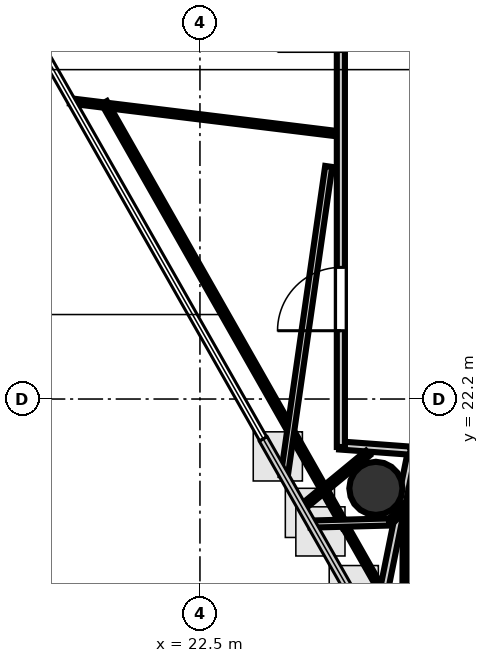
"""IFC4 building model, lengths in metres.
Left out: names, types, materials, properties, quantities, classifications, styles, units other than length and angle.
Written with IfcOpenShell. Run it as: python <this file> out.ifc"""

import sys

from ifc_helpers import new_model, si_unit, direction, frame, frame_2d, origin, origin_2d, place, context, subcontext, project, spatial, rectangle, hollow_circle, extrude, element, fill, save


model = new_model("IFC4")
c1 = context("Model", 3, precision=1e-05, world=origin(), true_north=direction((0.0, 1.0)))
c2 = subcontext(c1, "Body", "Model", "MODEL_VIEW")
j1 = project(units=[si_unit("LENGTHUNIT", "METRE"), si_unit("PLANEANGLEUNIT", "RADIAN")], contexts=[c1])
p1 = place(None, origin())
s1 = spatial("IfcSite", under=j1, at=p1, CompositionType="ELEMENT")
p2 = place(p1, origin())
s2 = spatial("IfcBuilding", under=s1, at=p2, CompositionType="ELEMENT")
p3 = place(p2, frame((0.0, 0.0, 272.3)))
s3 = spatial("IfcBuildingStorey", under=s2, at=p3, CompositionType="ELEMENT", Elevation=272.3)
p4 = place(p3, frame((25.972, 20.437, 0.0), z_axis=(0.0, 0.0, 1.0), x_axis=(1.0, 0.0, 0.0)))
e1 = element("IfcColumn", 1, at=p4, inside=s3, PredefinedType="COLUMN", context=c2, shape_type="SweptSolid", body=[
    extrude(hollow_circle(Radius=0.525, WallThickness=0.028, at=origin_2d()), origin(), (0.0, 0.0, 1.0), 3.7),
])
p5 = place(p3, frame((25.951, 17.535, 0.0), z_axis=(0.0, 0.0, 1.0), x_axis=(0.197834740862, 0.980235387704, 0.0)))
e2 = element("IfcWall", 2, at=p5, inside=s3, PredefinedType="PARTITIONING", context=c2, shape_type="SweptSolid", body=[
    extrude(rectangle(XDim=3.688, YDim=0.16, at=frame_2d((1.844, 0.0))), origin(), (0.0, 0.0, 1.0), 2.72),
])
p6 = place(p3, frame((26.652, 21.181, 0.0), z_axis=(0.0, 0.0, 1.0), x_axis=(-0.997303696291, 0.073384857861, 0.0)))
e3 = element("IfcWall", 3, at=p6, inside=s3, PredefinedType="PARTITIONING", context=c2, shape_type="SweptSolid", body=[
    extrude(rectangle(XDim=1.404, YDim=0.16, at=frame_2d((0.702, 0.0))), origin(), (0.0, 0.0, 1.0), 2.72),
])
p7 = place(p3, frame((25.281, 21.253, 0.0), z_axis=(0.0, 0.0, 1.0), x_axis=(0.0, 1.0, 0.0)))
e4 = element("IfcWall", 4, at=p7, inside=s3, PredefinedType="PARTITIONING", context=c2, shape_type="SweptSolid", body=[
    extrude(rectangle(XDim=11.297, YDim=0.16, at=frame_2d((5.648, 0.0))), origin(), (0.0, 0.0, 1.0), 2.72),
])
p8 = place(p7, frame((2.295, 0.0, 0.0)))
e5 = element("IfcOpeningElement", 5, at=p8, cuts=e4, PredefinedType="OPENING", context=c2, shape_type="SweptSolid", body=[
    extrude(rectangle(XDim=1.25, YDim=2.2, at=frame_2d((0.625, 1.1))), frame((0.0, 0.09, 0.0), z_axis=(0.0, -1.0, 0.0), x_axis=(1.0, 0.0, 0.0)), (0.0, 0.0, 1.0), 0.18),
])
p9 = place(p7, frame((7.805, 0.0, 0.0)))
e6 = element("IfcOpeningElement", 6, at=p9, cuts=e4, PredefinedType="OPENING", context=c2, shape_type="SweptSolid", body=[
    extrude(rectangle(XDim=1.25, YDim=2.2, at=frame_2d((0.625, 1.1))), frame((0.0, 0.09, 0.0), z_axis=(0.0, -1.0, 0.0), x_axis=(1.0, 0.0, 0.0)), (0.0, 0.0, 1.0), 0.18),
])
p10 = place(p3, frame((25.814, 21.132, 0.0), z_axis=(0.0, 0.0, 1.0), x_axis=(-0.771280007223, -0.636495994063, 0.0)))
e7 = element("IfcWall", 7, at=p10, inside=s3, PredefinedType="PARTITIONING", context=c2, shape_type="SweptSolid", body=[
    extrude(rectangle(XDim=1.703, YDim=0.12, at=frame_2d((0.851, 0.0))), origin(), (0.0, 0.0, 1.0), 2.72),
])
p11 = place(p3, frame((25.365, 19.684, 0.0), z_axis=(0.0, 0.0, 1.0), x_axis=(-0.493962326572, 0.869483306296, 0.0)))
e8 = element("IfcWall", 8, at=p11, inside=s3, PredefinedType="PARTITIONING", context=c2, shape_type="SweptSolid", body=[
    extrude(rectangle(XDim=9.622, YDim=0.12, at=frame_2d((4.811, 0.0))), origin(), (0.0, 0.0, 1.0), 2.72),
])
p12 = place(p3, frame((19.941, 28.083, 0.0), z_axis=(0.0, 0.0, 1.0), x_axis=(0.992540305233, -0.121916949141, 0.0)))
e9 = element("IfcWall", 9, at=p12, inside=s3, PredefinedType="PARTITIONING", context=c2, shape_type="SweptSolid", body=[
    extrude(rectangle(XDim=5.265, YDim=0.105, at=frame_2d((2.632, 0.0))), origin(), (0.0, 0.0, 1.0), 2.72),
])
p13 = place(p3, frame((25.041, 26.79, 0.0), z_axis=(0.0, 0.0, 1.0), x_axis=(-0.14221349632, -0.989836007359, 0.0)))
e10 = element("IfcWall", 10, at=p13, inside=s3, PredefinedType="PARTITIONING", context=c2, shape_type="SweptSolid", body=[
    extrude(rectangle(XDim=6.17, YDim=0.14, at=frame_2d((3.085, 0.0))), origin(), (0.0, 0.0, 1.0), 2.72),
])
p14 = place(p3, frame((30.847, 10.033, 0.0), z_axis=(0.0, 0.0, 1.0), x_axis=(-0.493936675542, 0.869497878407, 0.0)))
e11 = element("IfcWall", 11, at=p14, inside=s3, PredefinedType="PARTITIONING", context=c2, shape_type="SweptSolid", body=[
    extrude(rectangle(XDim=11.015, YDim=0.105, at=frame_2d((5.508, 0.0))), origin(), (0.0, 0.0, 1.0), 2.72),
])
p15 = place(p3, frame((24.683, 19.732, 0.0), z_axis=(0.0, 0.0, 1.0), x_axis=(0.999646809625, 0.026575477556, 0.0)))
e12 = element("IfcWall", 12, at=p15, inside=s3, PredefinedType="PARTITIONING", context=c2, shape_type="SweptSolid", body=[
    extrude(rectangle(XDim=1.552, YDim=0.14, at=frame_2d((0.776, 0.0))), origin(), (0.0, 0.0, 1.0), 2.72),
])
p16 = place(p3, frame((26.256, 19.782, 0.0), z_axis=(0.0, 0.0, 1.0), x_axis=(0.72060446241, 0.693346384396, 0.0)))
e13 = element("IfcWall", 13, at=p16, inside=s3, PredefinedType="PARTITIONING", context=c2, shape_type="SweptSolid", body=[
    extrude(rectangle(XDim=0.493, YDim=0.12, at=frame_2d((0.246, 0.0))), origin(), (0.0, 0.0, 1.0), 2.72),
])
p17 = place(p3, frame((26.558, 20.146, 0.0), z_axis=(0.0, 0.0, 1.0), x_axis=(-0.005868521817, -0.999982780078, 0.0)))
e14 = element("IfcWall", 14, at=p17, inside=s3, PredefinedType="PARTITIONING", context=c2, shape_type="SweptSolid", body=[
    extrude(rectangle(XDim=3.661, YDim=0.105, at=frame_2d((1.831, 0.0))), origin(), (0.0, 0.0, 1.0), 2.72),
])
p18 = place(p8, origin())
e15 = element("IfcDoor", 15, at=p18, inside=s3, OperationType="SINGLE_SWING_LEFT", PredefinedType="DOOR", context=c2, shape_type="SweptSolid", body=[
    extrude(rectangle(XDim=1.25, YDim=2.2, at=frame_2d((0.625, 1.1))), frame((0.0, 0.025, 0.0), z_axis=(0.0, -1.0, 0.0), x_axis=(1.0, 0.0, 0.0)), (0.0, 0.0, 1.0), 0.05),
])
fill(e5, e15)
save(model, sys.argv[1])
